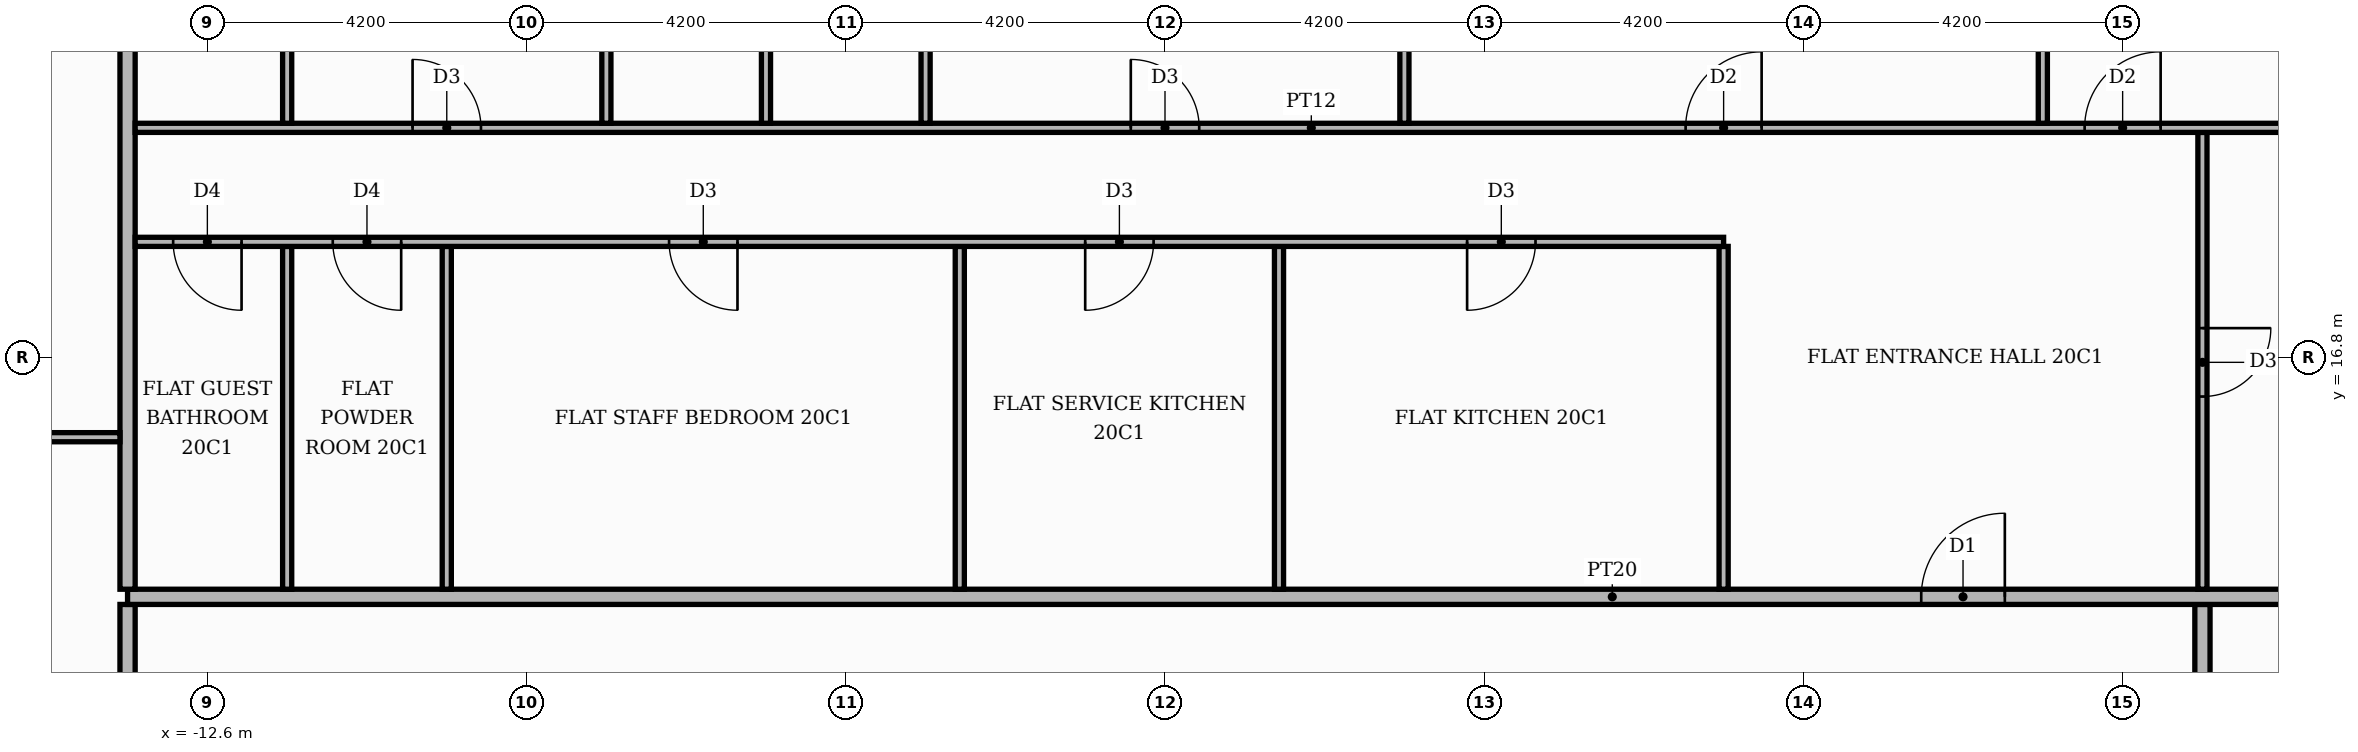
"""IFC4 building model, lengths in metres.
Left out: names, types, materials, properties, quantities, classifications, styles, units other than length and angle.
Written with IfcOpenShell. Run it as: python <this file> out.ifc"""

import sys

from ifc_helpers import new_model, si_unit, direction, frame, frame_2d, origin, place, context, subcontext, project, spatial, rectangle, extrude, element, fill, save


model = new_model("IFC4")
c1 = context("Model", 3, precision=1e-05, world=origin(), true_north=direction((0.0, 1.0)))
c2 = subcontext(c1, "Body", "Model", "MODEL_VIEW")
j1 = project(units=[si_unit("LENGTHUNIT", "METRE"), si_unit("PLANEANGLEUNIT", "RADIAN")], contexts=[c1])
p1 = place(None, origin())
s1 = spatial("IfcSite", under=j1, at=p1, CompositionType="ELEMENT")
p2 = place(p1, origin())
s2 = spatial("IfcBuilding", under=s1, at=p2, CompositionType="ELEMENT")
p3 = place(p2, frame((0.0, 0.0, 87.0)))
s3 = spatial("IfcBuildingStorey", under=s2, at=p3, CompositionType="ELEMENT", Elevation=87.0)
p4 = place(p3, frame((-13.65, -13.55, 0.0), z_axis=(0.0, 0.0, 1.0), x_axis=(0.0, 1.0, 0.0)))
e1 = element("IfcWall", 1, at=p4, inside=s3, PredefinedType="PARTITIONING", context=c2, shape_type="SweptSolid", body=[
    extrude(rectangle(XDim=27.1, YDim=0.2, at=frame_2d((13.55, 0.0))), origin(), (0.0, 0.0, 1.0), 3.48),
])
p5 = place(p4, frame((24.55, 0.0, 0.0)))
e2 = element("IfcOpeningElement", 2, at=p5, cuts=e1, PredefinedType="OPENING", context=c2, shape_type="SweptSolid", body=[
    extrude(rectangle(XDim=1.1, YDim=2.4, at=frame_2d((0.55, 1.2))), frame((0.0, 0.11, 0.0), z_axis=(0.0, -1.0, 0.0), x_axis=(1.0, 0.0, 0.0)), (0.0, 0.0, 1.0), 0.22),
])
p6 = place(p3, frame((13.65, -5.15, 0.0), z_axis=(0.0, 0.0, 1.0), x_axis=(0.0, 1.0, 0.0)))
e3 = element("IfcWall", 3, at=p6, inside=s3, PredefinedType="PARTITIONING", context=c2, shape_type="SweptSolid", body=[
    extrude(rectangle(XDim=18.7, YDim=0.2, at=frame_2d((9.35, 0.0))), origin(), (0.0, 0.0, 1.0), 3.48),
])
p7 = place(p6, frame((3.55, 0.0, 0.0)))
e4 = element("IfcOpeningElement", 4, at=p7, cuts=e3, PredefinedType="OPENING", context=c2, shape_type="SweptSolid", body=[
    extrude(rectangle(XDim=1.1, YDim=2.4, at=frame_2d((0.55, 1.2))), frame((0.0, 0.11, 0.0), z_axis=(0.0, -1.0, 0.0), x_axis=(1.0, 0.0, 0.0)), (0.0, 0.0, 1.0), 0.22),
])
p8 = place(p3, frame((-13.65, 13.65, 0.0), z_axis=(0.0, 0.0, 1.0), x_axis=(1.0, 0.0, 0.0)))
e5 = element("IfcWall", 5, at=p8, inside=s3, PredefinedType="PARTITIONING", context=c2, shape_type="SweptSolid", body=[
    extrude(rectangle(XDim=39.07, YDim=0.2, at=frame_2d((19.535, 0.0))), origin(), (0.0, 0.0, 1.0), 3.48),
])
p9 = place(p8, frame((23.6, 0.0, 0.0)))
e6 = element("IfcOpeningElement", 6, at=p9, cuts=e5, PredefinedType="OPENING", context=c2, shape_type="SweptSolid", body=[
    extrude(rectangle(XDim=1.1, YDim=2.4, at=frame_2d((0.55, 1.2))), frame((0.0, 0.11, 0.0), z_axis=(0.0, -1.0, 0.0), x_axis=(1.0, 0.0, 0.0)), (0.0, 0.0, 1.0), 0.22),
])
p10 = place(p3, frame((-13.65, 13.75, 0.0), z_axis=(0.0, 0.0, 1.0), x_axis=(0.0, 1.0, 0.0)))
e7 = element("IfcWall", 7, at=p10, inside=s3, PredefinedType="PARTITIONING", context=c2, shape_type="SweptSolid", body=[
    extrude(rectangle(XDim=11.67, YDim=0.2, at=frame_2d((5.835, 0.0))), origin(), (0.0, 0.0, 1.0), 3.48),
])
for number, where, z_axis, x_axis in (
    (8, (-11.55, 13.75, 0.0), (0.0, 0.0, 1.0), (0.0, 1.0, 0.0)),
    (9, (-9.45, 13.75, 0.0), (0.0, 0.0, 1.0), (0.0, 1.0, 0.0)),
    (10, (-2.7, 13.75, 0.0), (0.0, 0.0, 1.0), (0.0, 1.0, 0.0)),
    (11, (1.5, 13.75, 0.0), (0.0, 0.0, 1.0), (0.0, 1.0, 0.0)),
    (12, (7.35, 13.75, 0.0), (0.0, 0.0, 1.0), (0.0, 1.0, 0.0)),
):
    element("IfcWall", number, at=place(p3, frame(where, z_axis=z_axis, x_axis=x_axis)), inside=s3, PredefinedType="PARTITIONING", context=c2, shape_type="SweptSolid", body=[
        extrude(rectangle(XDim=4.51, YDim=0.12, at=frame_2d((2.255, 0.0))), origin(), (0.0, 0.0, 1.0), 3.48),
    ])
p11 = place(p3, frame((13.65, 13.75, 0.0), z_axis=(0.0, 0.0, 1.0), x_axis=(0.0, 1.0, 0.0)))
e13 = element("IfcWall", 13, at=p11, inside=s3, PredefinedType="PARTITIONING", context=c2, shape_type="SweptSolid", body=[
    extrude(rectangle(XDim=6.01, YDim=0.12, at=frame_2d((3.005, 0.0))), origin(), (0.0, 0.0, 1.0), 3.48),
])
p12 = place(p11, frame((2.535, 0.0, 0.0)))
e14 = element("IfcOpeningElement", 14, at=p12, cuts=e13, PredefinedType="OPENING", context=c2, shape_type="SweptSolid", body=[
    extrude(rectangle(XDim=0.9, YDim=2.1, at=frame_2d((0.45, 1.05))), frame((0.0, 0.07, 0.0), z_axis=(0.0, -1.0, 0.0), x_axis=(1.0, 0.0, 0.0)), (0.0, 0.0, 1.0), 0.14),
])
p13 = place(p3, frame((-19.82, 15.75, 0.0), z_axis=(0.0, 0.0, 1.0), x_axis=(1.0, 0.0, 0.0)))
e15 = element("IfcWall", 15, at=p13, inside=s3, PredefinedType="PARTITIONING", context=c2, shape_type="SweptSolid", body=[
    extrude(rectangle(XDim=6.07, YDim=0.12, at=frame_2d((3.035, 0.0))), origin(), (0.0, 0.0, 1.0), 3.48),
])
p14 = place(p13, frame((2.635, 0.0, 0.0)))
e16 = element("IfcOpeningElement", 16, at=p14, cuts=e15, PredefinedType="OPENING", context=c2, shape_type="SweptSolid", body=[
    extrude(rectangle(XDim=0.9, YDim=2.1, at=frame_2d((0.45, 1.05))), frame((0.0, 0.07, 0.0), z_axis=(0.0, -1.0, 0.0), x_axis=(1.0, 0.0, 0.0)), (0.0, 0.0, 1.0), 0.14),
])
p15 = place(p3, frame((-13.55, 18.32, 0.0), z_axis=(0.0, 0.0, 1.0), x_axis=(1.0, 0.0, 0.0)))
e17 = element("IfcWall", 17, at=p15, inside=s3, PredefinedType="PARTITIONING", context=c2, shape_type="SweptSolid", body=[
    extrude(rectangle(XDim=20.9, YDim=0.12, at=frame_2d((10.45, 0.0))), origin(), (0.0, 0.0, 1.0), 3.48),
])
p16 = place(p15, frame((17.525, 0.0, 0.0)))
e18 = element("IfcOpeningElement", 18, at=p16, cuts=e17, PredefinedType="OPENING", context=c2, shape_type="SweptSolid", body=[
    extrude(rectangle(XDim=0.9, YDim=2.1, at=frame_2d((0.45, 1.05))), frame((0.0, 0.07, 0.0), z_axis=(0.0, -1.0, 0.0), x_axis=(1.0, 0.0, 0.0)), (0.0, 0.0, 1.0), 0.14),
])
p17 = place(p15, frame((12.5, 0.0, 0.0)))
e19 = element("IfcOpeningElement", 19, at=p17, cuts=e17, PredefinedType="OPENING", context=c2, shape_type="SweptSolid", body=[
    extrude(rectangle(XDim=0.9, YDim=2.1, at=frame_2d((0.45, 1.05))), frame((0.0, 0.07, 0.0), z_axis=(0.0, -1.0, 0.0), x_axis=(1.0, 0.0, 0.0)), (0.0, 0.0, 1.0), 0.14),
])
p18 = place(p15, frame((7.025, 0.0, 0.0)))
e20 = element("IfcOpeningElement", 20, at=p18, cuts=e17, PredefinedType="OPENING", context=c2, shape_type="SweptSolid", body=[
    extrude(rectangle(XDim=0.9, YDim=2.1, at=frame_2d((0.45, 1.05))), frame((0.0, 0.07, 0.0), z_axis=(0.0, -1.0, 0.0), x_axis=(1.0, 0.0, 0.0)), (0.0, 0.0, 1.0), 0.14),
])
p19 = place(p15, frame((2.6, 0.0, 0.0)))
e21 = element("IfcOpeningElement", 21, at=p19, cuts=e17, PredefinedType="OPENING", context=c2, shape_type="SweptSolid", body=[
    extrude(rectangle(XDim=0.9, YDim=2.1, at=frame_2d((0.45, 1.05))), frame((0.0, 0.07, 0.0), z_axis=(0.0, -1.0, 0.0), x_axis=(1.0, 0.0, 0.0)), (0.0, 0.0, 1.0), 0.14),
])
p20 = place(p15, frame((0.5, 0.0, 0.0)))
e22 = element("IfcOpeningElement", 22, at=p20, cuts=e17, PredefinedType="OPENING", context=c2, shape_type="SweptSolid", body=[
    extrude(rectangle(XDim=0.9, YDim=2.1, at=frame_2d((0.45, 1.05))), frame((0.0, 0.07, 0.0), z_axis=(0.0, -1.0, 0.0), x_axis=(1.0, 0.0, 0.0)), (0.0, 0.0, 1.0), 0.14),
])
p21 = place(p3, frame((-13.55, 19.82, 0.0), z_axis=(0.0, 0.0, 1.0), x_axis=(1.0, 0.0, 0.0)))
e23 = element("IfcWall", 23, at=p21, inside=s3, PredefinedType="PARTITIONING", context=c2, shape_type="SweptSolid", body=[
    extrude(rectangle(XDim=30.95, YDim=0.12, at=frame_2d((15.475, 0.0))), origin(), (0.0, 0.0, 1.0), 3.48),
])
p22 = place(p21, frame((25.65, 0.0, 0.0)))
e24 = element("IfcOpeningElement", 24, at=p22, cuts=e23, PredefinedType="OPENING", context=c2, shape_type="SweptSolid", body=[
    extrude(rectangle(XDim=1.0, YDim=2.1, at=frame_2d((0.5, 1.05))), frame((0.0, 0.07, 0.0), z_axis=(0.0, -1.0, 0.0), x_axis=(1.0, 0.0, 0.0)), (0.0, 0.0, 1.0), 0.14),
])
p23 = place(p21, frame((20.4, 0.0, 0.0)))
e25 = element("IfcOpeningElement", 25, at=p23, cuts=e23, PredefinedType="OPENING", context=c2, shape_type="SweptSolid", body=[
    extrude(rectangle(XDim=1.0, YDim=2.1, at=frame_2d((0.5, 1.05))), frame((0.0, 0.07, 0.0), z_axis=(0.0, -1.0, 0.0), x_axis=(1.0, 0.0, 0.0)), (0.0, 0.0, 1.0), 0.14),
])
p24 = place(p21, frame((13.1, 0.0, 0.0)))
e26 = element("IfcOpeningElement", 26, at=p24, cuts=e23, PredefinedType="OPENING", context=c2, shape_type="SweptSolid", body=[
    extrude(rectangle(XDim=0.9, YDim=2.1, at=frame_2d((0.45, 1.05))), frame((0.0, 0.07, 0.0), z_axis=(0.0, -1.0, 0.0), x_axis=(1.0, 0.0, 0.0)), (0.0, 0.0, 1.0), 0.14),
])
p25 = place(p21, frame((3.65, 0.0, 0.0)))
e27 = element("IfcOpeningElement", 27, at=p25, cuts=e23, PredefinedType="OPENING", context=c2, shape_type="SweptSolid", body=[
    extrude(rectangle(XDim=0.9, YDim=2.1, at=frame_2d((0.45, 1.05))), frame((0.0, 0.07, 0.0), z_axis=(0.0, -1.0, 0.0), x_axis=(1.0, 0.0, 0.0)), (0.0, 0.0, 1.0), 0.14),
])
p26 = place(p3, frame((-11.55, 19.88, 0.0), z_axis=(0.0, 0.0, 1.0), x_axis=(0.0, 1.0, 0.0)))
e28 = element("IfcWall", 28, at=p26, inside=s3, PredefinedType="PARTITIONING", context=c2, shape_type="SweptSolid", body=[
    extrude(rectangle(XDim=5.54, YDim=0.12, at=frame_2d((2.77, 0.0))), origin(), (0.0, 0.0, 1.0), 3.48),
])
p27 = place(p26, frame((2.44, 0.0, 0.0)))
e29 = element("IfcOpeningElement", 29, at=p27, cuts=e28, PredefinedType="OPENING", context=c2, shape_type="SweptSolid", body=[
    extrude(rectangle(XDim=0.9, YDim=2.1, at=frame_2d((0.45, 1.05))), frame((0.0, 0.07, 0.0), z_axis=(0.0, -1.0, 0.0), x_axis=(1.0, 0.0, 0.0)), (0.0, 0.0, 1.0), 0.14),
])
p28 = place(p3, frame((-7.35, 19.88, 0.0), z_axis=(0.0, 0.0, 1.0), x_axis=(0.0, 1.0, 0.0)))
e30 = element("IfcWall", 30, at=p28, inside=s3, PredefinedType="PARTITIONING", context=c2, shape_type="SweptSolid", body=[
    extrude(rectangle(XDim=5.54, YDim=0.12, at=frame_2d((2.77, 0.0))), origin(), (0.0, 0.0, 1.0), 3.48),
])
p29 = place(p3, frame((-5.25, 19.88, 0.0), z_axis=(0.0, 0.0, 1.0), x_axis=(0.0, 1.0, 0.0)))
e31 = element("IfcWall", 31, at=p29, inside=s3, PredefinedType="PARTITIONING", context=c2, shape_type="SweptSolid", body=[
    extrude(rectangle(XDim=5.54, YDim=0.12, at=frame_2d((2.77, 0.0))), origin(), (0.0, 0.0, 1.0), 3.48),
])
p30 = place(p29, frame((2.44, 0.0, 0.0)))
e32 = element("IfcOpeningElement", 32, at=p30, cuts=e31, PredefinedType="OPENING", context=c2, shape_type="SweptSolid", body=[
    extrude(rectangle(XDim=0.9, YDim=2.1, at=frame_2d((0.45, 1.05))), frame((0.0, 0.07, 0.0), z_axis=(0.0, -1.0, 0.0), x_axis=(1.0, 0.0, 0.0)), (0.0, 0.0, 1.0), 0.14),
])
p31 = place(p3, frame((-3.15, 19.88, 0.0), z_axis=(0.0, 0.0, 1.0), x_axis=(0.0, 1.0, 0.0)))
e33 = element("IfcWall", 33, at=p31, inside=s3, PredefinedType="PARTITIONING", context=c2, shape_type="SweptSolid", body=[
    extrude(rectangle(XDim=5.54, YDim=0.12, at=frame_2d((2.77, 0.0))), origin(), (0.0, 0.0, 1.0), 3.48),
])
p32 = place(p31, frame((2.44, 0.0, 0.0)))
e34 = element("IfcOpeningElement", 34, at=p32, cuts=e33, PredefinedType="OPENING", context=c2, shape_type="SweptSolid", body=[
    extrude(rectangle(XDim=0.9, YDim=2.1, at=frame_2d((0.45, 1.05))), frame((0.0, 0.07, 0.0), z_axis=(0.0, -1.0, 0.0), x_axis=(1.0, 0.0, 0.0)), (0.0, 0.0, 1.0), 0.14),
])
for number, where, z_axis, x_axis in (
    (35, (3.15, 19.88, 0.0), (0.0, 0.0, 1.0), (0.0, 1.0, 0.0)),
    (36, (11.55, 19.88, 0.0), (0.0, 0.0, 1.0), (0.0, 1.0, 0.0)),
):
    element("IfcWall", number, at=place(p3, frame(where, z_axis=z_axis, x_axis=x_axis)), inside=s3, PredefinedType="PARTITIONING", context=c2, shape_type="SweptSolid", body=[
        extrude(rectangle(XDim=5.54, YDim=0.12, at=frame_2d((2.77, 0.0))), origin(), (0.0, 0.0, 1.0), 3.48),
    ])
p33 = place(p9, origin())
e37 = element("IfcDoor", 37, at=p33, inside=s3, OperationType="SINGLE_SWING_RIGHT", PredefinedType="DOOR", context=c2, shape_type="SweptSolid", body=[
    extrude(rectangle(XDim=1.1, YDim=2.4, at=frame_2d((0.55, 1.2))), frame((0.0, 0.025, 0.0), z_axis=(0.0, -1.0, 0.0), x_axis=(1.0, 0.0, 0.0)), (0.0, 0.0, 1.0), 0.05),
])
fill(e6, e37)
p34 = place(p12, frame((0.9, 0.0, 0.0), z_axis=(0.0, 0.0, 1.0), x_axis=(-1.0, 0.0, 0.0)))
e38 = element("IfcDoor", 38, at=p34, inside=s3, OperationType="SINGLE_SWING_RIGHT", PredefinedType="DOOR", context=c2, shape_type="SweptSolid", body=[
    extrude(rectangle(XDim=0.9, YDim=2.1, at=frame_2d((0.45, 1.05))), frame((0.0, 0.025, 0.0), z_axis=(0.0, -1.0, 0.0), x_axis=(1.0, 0.0, 0.0)), (0.0, 0.0, 1.0), 0.05),
])
fill(e14, e38)
p35 = place(p16, frame((0.9, 0.0, 0.0), z_axis=(0.0, 0.0, 1.0), x_axis=(-1.0, 0.0, 0.0)))
e39 = element("IfcDoor", 39, at=p35, inside=s3, OperationType="SINGLE_SWING_LEFT", PredefinedType="DOOR", context=c2, shape_type="SweptSolid", body=[
    extrude(rectangle(XDim=0.9, YDim=2.1, at=frame_2d((0.45, 1.05))), frame((0.0, 0.025, 0.0), z_axis=(0.0, -1.0, 0.0), x_axis=(1.0, 0.0, 0.0)), (0.0, 0.0, 1.0), 0.05),
])
fill(e18, e39)
p36 = place(p17, frame((0.9, 0.0, 0.0), z_axis=(0.0, 0.0, 1.0), x_axis=(-1.0, 0.0, 0.0)))
e40 = element("IfcDoor", 40, at=p36, inside=s3, OperationType="SINGLE_SWING_LEFT", PredefinedType="DOOR", context=c2, shape_type="SweptSolid", body=[
    extrude(rectangle(XDim=0.9, YDim=2.1, at=frame_2d((0.45, 1.05))), frame((0.0, 0.025, 0.0), z_axis=(0.0, -1.0, 0.0), x_axis=(1.0, 0.0, 0.0)), (0.0, 0.0, 1.0), 0.05),
])
fill(e19, e40)
p37 = place(p18, frame((0.9, 0.0, 0.0), z_axis=(0.0, 0.0, 1.0), x_axis=(-1.0, 0.0, 0.0)))
e41 = element("IfcDoor", 41, at=p37, inside=s3, OperationType="SINGLE_SWING_RIGHT", PredefinedType="DOOR", context=c2, shape_type="SweptSolid", body=[
    extrude(rectangle(XDim=0.9, YDim=2.1, at=frame_2d((0.45, 1.05))), frame((0.0, 0.025, 0.0), z_axis=(0.0, -1.0, 0.0), x_axis=(1.0, 0.0, 0.0)), (0.0, 0.0, 1.0), 0.05),
])
fill(e20, e41)
p38 = place(p19, frame((0.9, 0.0, 0.0), z_axis=(0.0, 0.0, 1.0), x_axis=(-1.0, 0.0, 0.0)))
e42 = element("IfcDoor", 42, at=p38, inside=s3, OperationType="SINGLE_SWING_RIGHT", PredefinedType="DOOR", context=c2, shape_type="SweptSolid", body=[
    extrude(rectangle(XDim=0.9, YDim=2.1, at=frame_2d((0.45, 1.05))), frame((0.0, 0.025, 0.0), z_axis=(0.0, -1.0, 0.0), x_axis=(1.0, 0.0, 0.0)), (0.0, 0.0, 1.0), 0.05),
])
fill(e21, e42)
p39 = place(p20, frame((0.9, 0.0, 0.0), z_axis=(0.0, 0.0, 1.0), x_axis=(-1.0, 0.0, 0.0)))
e43 = element("IfcDoor", 43, at=p39, inside=s3, OperationType="SINGLE_SWING_RIGHT", PredefinedType="DOOR", context=c2, shape_type="SweptSolid", body=[
    extrude(rectangle(XDim=0.9, YDim=2.1, at=frame_2d((0.45, 1.05))), frame((0.0, 0.025, 0.0), z_axis=(0.0, -1.0, 0.0), x_axis=(1.0, 0.0, 0.0)), (0.0, 0.0, 1.0), 0.05),
])
fill(e22, e43)
p40 = place(p22, origin())
e44 = element("IfcDoor", 44, at=p40, inside=s3, OperationType="SINGLE_SWING_RIGHT", PredefinedType="DOOR", context=c2, shape_type="SweptSolid", body=[
    extrude(rectangle(XDim=1.0, YDim=2.1, at=frame_2d((0.5, 1.05))), frame((0.0, 0.025, 0.0), z_axis=(0.0, -1.0, 0.0), x_axis=(1.0, 0.0, 0.0)), (0.0, 0.0, 1.0), 0.05),
])
fill(e24, e44)
p41 = place(p23, origin())
e45 = element("IfcDoor", 45, at=p41, inside=s3, OperationType="SINGLE_SWING_RIGHT", PredefinedType="DOOR", context=c2, shape_type="SweptSolid", body=[
    extrude(rectangle(XDim=1.0, YDim=2.1, at=frame_2d((0.5, 1.05))), frame((0.0, 0.025, 0.0), z_axis=(0.0, -1.0, 0.0), x_axis=(1.0, 0.0, 0.0)), (0.0, 0.0, 1.0), 0.05),
])
fill(e25, e45)
p42 = place(p24, origin())
e46 = element("IfcDoor", 46, at=p42, inside=s3, OperationType="SINGLE_SWING_LEFT", PredefinedType="DOOR", context=c2, shape_type="SweptSolid", body=[
    extrude(rectangle(XDim=0.9, YDim=2.1, at=frame_2d((0.45, 1.05))), frame((0.0, 0.025, 0.0), z_axis=(0.0, -1.0, 0.0), x_axis=(1.0, 0.0, 0.0)), (0.0, 0.0, 1.0), 0.05),
])
fill(e26, e46)
p43 = place(p25, origin())
e47 = element("IfcDoor", 47, at=p43, inside=s3, OperationType="SINGLE_SWING_LEFT", PredefinedType="DOOR", context=c2, shape_type="SweptSolid", body=[
    extrude(rectangle(XDim=0.9, YDim=2.1, at=frame_2d((0.45, 1.05))), frame((0.0, 0.025, 0.0), z_axis=(0.0, -1.0, 0.0), x_axis=(1.0, 0.0, 0.0)), (0.0, 0.0, 1.0), 0.05),
])
fill(e27, e47)
save(model, sys.argv[1])
